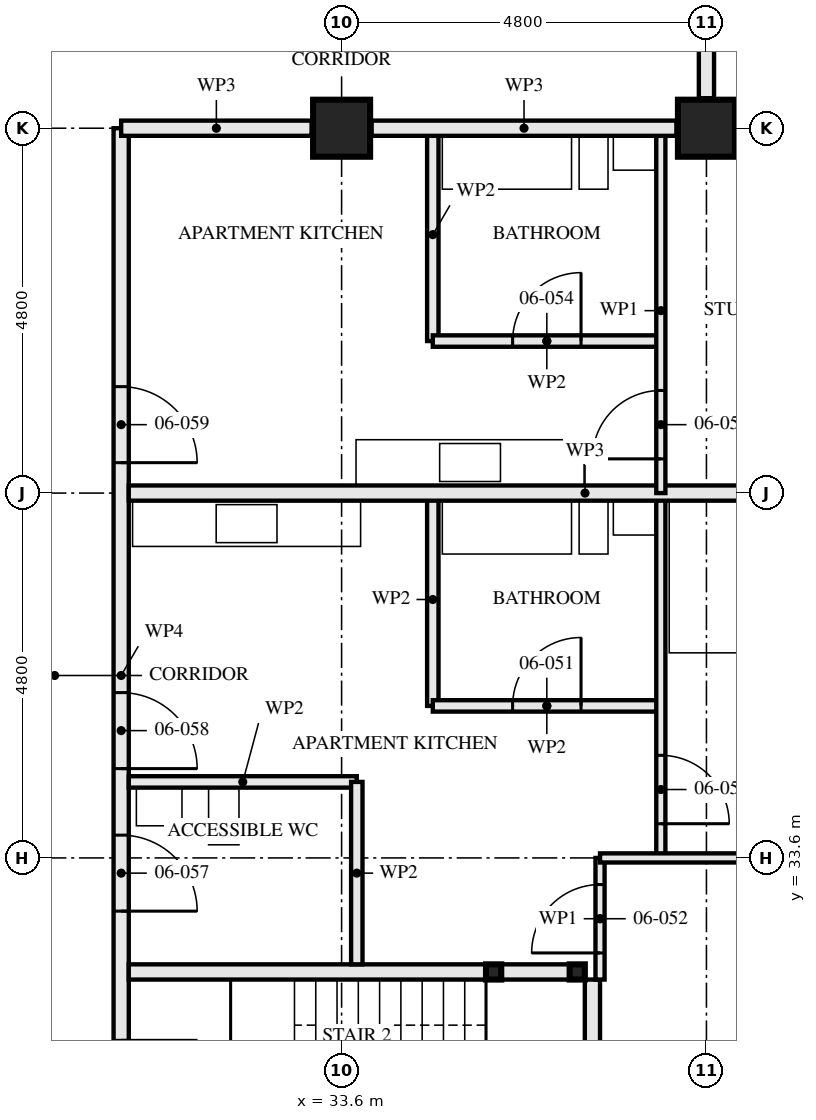
"""IFC4 building model, lengths in metres.
Left out: names, types, materials, properties, quantities, classifications, styles, units other than length and angle.
Written with IfcOpenShell. Run it as: python <this file> out.ifc"""

import sys

from ifc_helpers import new_model, si_unit, direction, frame, frame_2d, origin, origin_2d, place, context, subcontext, project, spatial, rectangle, hollow_rectangle, extrude, element, fill, save


model = new_model("IFC4")
c1 = context("Model", 3, precision=1e-05, world=origin(), true_north=direction((0.0, 1.0)))
c2 = subcontext(c1, "Body", "Model", "MODEL_VIEW")
j1 = project(units=[si_unit("LENGTHUNIT", "METRE"), si_unit("PLANEANGLEUNIT", "RADIAN")], contexts=[c1])
p1 = place(None, origin())
s1 = spatial("IfcSite", under=j1, at=p1, CompositionType="ELEMENT")
p2 = place(p1, origin())
s2 = spatial("IfcBuilding", under=s1, at=p2, CompositionType="ELEMENT")
p3 = place(p2, frame((0.0, 0.0, 27.0)))
s3 = spatial("IfcBuildingStorey", under=s2, at=p3, CompositionType="ELEMENT", Elevation=27.0)
for number, where, z_axis, x_axis in (
    (1, (33.6, 43.2, 0.0), (0.0, 0.0, 1.0), (0.0, 1.0, 0.0)),
    (2, (38.4, 43.2, 0.0), (0.0, 0.0, 1.0), (0.0, 1.0, 0.0)),
):
    element("IfcColumn", number, at=place(p3, frame(where, z_axis=z_axis, x_axis=x_axis)), inside=s3, PredefinedType="COLUMN", context=c2, shape_type="SweptSolid", body=[
        extrude(hollow_rectangle(XDim=0.75, YDim=0.75, WallThickness=0.08, at=origin_2d()), origin(), (0.0, 0.0, 1.0), 3.5),
    ])
for number, where, z_axis, x_axis in (
    (3, (36.7, 32.1, 0.0), (0.0, 0.0, 1.0), (1.0, 0.0, 0.0)),
    (4, (35.6, 32.1, 0.0), (0.0, 0.0, 1.0), (1.0, 0.0, 0.0)),
):
    element("IfcColumn", number, at=place(p3, frame(where, z_axis=z_axis, x_axis=x_axis)), inside=s3, PredefinedType="COLUMN", context=c2, shape_type="SweptSolid", body=[
        extrude(hollow_rectangle(XDim=0.2, YDim=0.2, WallThickness=0.008, at=origin_2d()), origin(), (0.0, 0.0, 1.0), 3.33),
    ])
p4 = place(p3, frame((36.6, 32.1, 0.0), z_axis=(0.0, 0.0, 1.0), x_axis=(-1.0, 0.0, 0.0)))
e5 = element("IfcWall", 5, at=p4, inside=s3, PredefinedType="SOLIDWALL", context=c2, shape_type="SweptSolid", body=[
    extrude(rectangle(XDim=0.9, YDim=0.2, at=frame_2d((0.45, 0.0))), origin(), (0.0, 0.0, 1.0), 2.99),
])
p5 = place(p3, frame((35.5, 32.1, 0.0), z_axis=(0.0, 0.0, 1.0), x_axis=(-1.0, 0.0, 0.0)))
e6 = element("IfcWall", 6, at=p5, inside=s3, PredefinedType="SOLIDWALL", context=c2, shape_type="SweptSolid", body=[
    extrude(rectangle(XDim=4.7, YDim=0.2, at=frame_2d((2.35, 0.0))), origin(), (0.0, 0.0, 1.0), 2.99),
])
p6 = place(p3, frame((36.9, 29.4, 0.0), z_axis=(0.0, 0.0, 1.0), x_axis=(0.0, 1.0, 0.0)))
e7 = element("IfcWall", 7, at=p6, inside=s3, PredefinedType="SOLIDWALL", context=c2, shape_type="SweptSolid", body=[
    extrude(rectangle(XDim=2.6, YDim=0.2, at=frame_2d((1.3, 0.0))), origin(), (0.0, 0.0, 1.0), 3.33),
])
p7 = place(p3, frame((33.8, 32.2, 0.0), z_axis=(0.0, 0.0, 1.0), x_axis=(0.0, 1.0, 0.0)))
e8 = element("IfcWall", 8, at=p7, inside=s3, PredefinedType="PARTITIONING", context=c2, shape_type="SweptSolid", body=[
    extrude(rectangle(XDim=2.4, YDim=0.15, at=frame_2d((1.2, 0.0))), origin(), (0.0, 0.0, 1.0), 2.55),
])
p8 = place(p3, frame((33.8, 34.6, 0.0), z_axis=(0.0, 0.0, 1.0), x_axis=(-1.0, 0.0, 0.0)))
e9 = element("IfcWall", 9, at=p8, inside=s3, PredefinedType="PARTITIONING", context=c2, shape_type="SweptSolid", body=[
    extrude(rectangle(XDim=3.0, YDim=0.15, at=frame_2d((1.5, 0.0))), origin(), (0.0, 0.0, 1.0), 3.33),
])
p9 = place(p3, frame((37.8, 35.6, 0.0), z_axis=(0.0, 0.0, 1.0), x_axis=(-1.0, 0.0, 0.0)))
e10 = element("IfcWall", 10, at=p9, inside=s3, PredefinedType="PARTITIONING", context=c2, shape_type="SweptSolid", body=[
    extrude(rectangle(XDim=3.0, YDim=0.15, at=frame_2d((1.5, 0.0))), origin(), (0.0, 0.0, 1.0), 3.33),
])
p10 = place(p9, frame((1.05, 0.0, 0.0)))
e11 = element("IfcOpeningElement", 11, at=p10, cuts=e10, PredefinedType="OPENING", context=c2, shape_type="SweptSolid", body=[
    extrude(rectangle(XDim=0.9, YDim=2.1, at=frame_2d((0.45, 1.05))), frame((0.0, 0.085, 0.0), z_axis=(0.0, -1.0, 0.0), x_axis=(1.0, 0.0, 0.0)), (0.0, 0.0, 1.0), 0.171),
])
p11 = place(p3, frame((34.8, 35.6, 0.0), z_axis=(0.0, 0.0, 1.0), x_axis=(0.0, 1.0, 0.0)))
e12 = element("IfcWall", 12, at=p11, inside=s3, PredefinedType="PARTITIONING", context=c2, shape_type="SweptSolid", body=[
    extrude(rectangle(XDim=2.8, YDim=0.15, at=frame_2d((1.4, 0.0))), origin(), (0.0, 0.0, 1.0), 3.33),
])
p12 = place(p3, frame((37.0, 32.0, 0.0), z_axis=(0.0, 0.0, 1.0), x_axis=(0.0, 1.0, 0.0)))
e13 = element("IfcWall", 13, at=p12, inside=s3, PredefinedType="PARTITIONING", context=c2, shape_type="SweptSolid", body=[
    extrude(rectangle(XDim=1.6, YDim=0.12, at=frame_2d((0.8, 0.0))), origin(), (0.0, 0.0, 1.0), 3.33),
])
p13 = place(p12, frame((0.35, 0.0, 0.0)))
e14 = element("IfcOpeningElement", 14, at=p13, cuts=e13, PredefinedType="OPENING", context=c2, shape_type="SweptSolid", body=[
    extrude(rectangle(XDim=0.9, YDim=2.1, at=frame_2d((0.45, 1.05))), frame((0.0, 0.071, 0.0), z_axis=(0.0, -1.0, 0.0), x_axis=(1.0, 0.0, 0.0)), (0.0, 0.0, 1.0), 0.141),
])
p14 = place(p3, frame((37.8, 33.6, 0.0), z_axis=(0.0, 0.0, 1.0), x_axis=(0.0, 1.0, 0.0)))
e15 = element("IfcWall", 15, at=p14, inside=s3, PredefinedType="PARTITIONING", context=c2, shape_type="SweptSolid", body=[
    extrude(rectangle(XDim=4.8, YDim=0.12, at=frame_2d((2.4, 0.0))), origin(), (0.0, 0.0, 1.0), 3.33),
])
p15 = place(p14, frame((0.45, 0.0, 0.0)))
e16 = element("IfcOpeningElement", 16, at=p15, cuts=e15, PredefinedType="OPENING", context=c2, shape_type="SweptSolid", body=[
    extrude(rectangle(XDim=0.9, YDim=2.1, at=frame_2d((0.45, 1.05))), frame((0.0, 0.071, 0.0), z_axis=(0.0, -1.0, 0.0), x_axis=(1.0, 0.0, 0.0)), (0.0, 0.0, 1.0), 0.141),
])
p16 = place(p3, frame((42.805, 33.6, 0.0), z_axis=(0.0, 0.0, 1.0), x_axis=(-1.0, 0.0, 0.0)))
e17 = element("IfcWall", 17, at=p16, inside=s3, PredefinedType="PARTITIONING", context=c2, shape_type="SweptSolid", body=[
    extrude(rectangle(XDim=5.805, YDim=0.12, at=frame_2d((2.902, 0.0))), origin(), (0.0, 0.0, 1.0), 2.55),
])
p17 = place(p3, frame((42.805, 38.4, 0.0), z_axis=(0.0, 0.0, 1.0), x_axis=(-1.0, 0.0, 0.0)))
e18 = element("IfcWall", 18, at=p17, inside=s3, PredefinedType="PARTITIONING", context=c2, shape_type="SweptSolid", body=[
    extrude(rectangle(XDim=12.005, YDim=0.2, at=frame_2d((6.002, 0.0))), origin(), (0.0, 0.0, 1.0), 2.55),
])
p18 = place(p3, frame((37.8, 40.4, 0.0), z_axis=(0.0, 0.0, 1.0), x_axis=(-1.0, 0.0, 0.0)))
e19 = element("IfcWall", 19, at=p18, inside=s3, PredefinedType="PARTITIONING", context=c2, shape_type="SweptSolid", body=[
    extrude(rectangle(XDim=3.0, YDim=0.15, at=frame_2d((1.5, 0.0))), origin(), (0.0, 0.0, 1.0), 3.33),
])
p19 = place(p18, frame((1.05, 0.0, 0.0)))
e20 = element("IfcOpeningElement", 20, at=p19, cuts=e19, PredefinedType="OPENING", context=c2, shape_type="SweptSolid", body=[
    extrude(rectangle(XDim=0.9, YDim=2.1, at=frame_2d((0.45, 1.05))), frame((0.0, 0.085, 0.0), z_axis=(0.0, -1.0, 0.0), x_axis=(1.0, 0.0, 0.0)), (0.0, 0.0, 1.0), 0.171),
])
p20 = place(p3, frame((34.8, 40.4, 0.0), z_axis=(0.0, 0.0, 1.0), x_axis=(0.0, 1.0, 0.0)))
e21 = element("IfcWall", 21, at=p20, inside=s3, PredefinedType="PARTITIONING", context=c2, shape_type="SweptSolid", body=[
    extrude(rectangle(XDim=2.8, YDim=0.15, at=frame_2d((1.4, 0.0))), origin(), (0.0, 0.0, 1.0), 3.33),
])
p21 = place(p3, frame((37.8, 38.4, 0.0), z_axis=(0.0, 0.0, 1.0), x_axis=(0.0, 1.0, 0.0)))
e22 = element("IfcWall", 22, at=p21, inside=s3, PredefinedType="PARTITIONING", context=c2, shape_type="SweptSolid", body=[
    extrude(rectangle(XDim=4.8, YDim=0.12, at=frame_2d((2.4, 0.0))), origin(), (0.0, 0.0, 1.0), 3.33),
])
p22 = place(p21, frame((0.45, 0.0, 0.0)))
e23 = element("IfcOpeningElement", 23, at=p22, cuts=e22, PredefinedType="OPENING", context=c2, shape_type="SweptSolid", body=[
    extrude(rectangle(XDim=0.9, YDim=2.1, at=frame_2d((0.45, 1.05))), frame((0.0, 0.071, 0.0), z_axis=(0.0, -1.0, 0.0), x_axis=(1.0, 0.0, 0.0)), (0.0, 0.0, 1.0), 0.141),
])
p23 = place(p3, frame((30.7, 28.8, 0.0), z_axis=(0.0, 0.0, 1.0), x_axis=(0.0, 1.0, 0.0)))
e24 = element("IfcWall", 24, at=p23, inside=s3, PredefinedType="PARTITIONING", context=c2, shape_type="SweptSolid", body=[
    extrude(rectangle(XDim=14.4, YDim=0.2, at=frame_2d((7.2, 0.0))), origin(), (0.0, 0.0, 1.0), 2.55),
])
p24 = place(p23, frame((1.4, 0.0, 0.0)))
e25 = element("IfcOpeningElement", 25, at=p24, cuts=e24, PredefinedType="OPENING", context=c2, shape_type="SweptSolid", body=[
    extrude(rectangle(XDim=1.0, YDim=2.1, at=frame_2d((0.5, 1.05))), frame((0.0, 0.111, 0.0), z_axis=(0.0, -1.0, 0.0), x_axis=(1.0, 0.0, 0.0)), (0.0, 0.0, 1.0), 0.221),
])
p25 = place(p23, frame((4.1, 0.0, 0.0)))
e26 = element("IfcOpeningElement", 26, at=p25, cuts=e24, PredefinedType="OPENING", context=c2, shape_type="SweptSolid", body=[
    extrude(rectangle(XDim=1.0, YDim=2.1, at=frame_2d((0.5, 1.05))), frame((0.0, 0.111, 0.0), z_axis=(0.0, -1.0, 0.0), x_axis=(1.0, 0.0, 0.0)), (0.0, 0.0, 1.0), 0.221),
])
p26 = place(p23, frame((5.975, 0.0, 0.0)))
e27 = element("IfcOpeningElement", 27, at=p26, cuts=e24, PredefinedType="OPENING", context=c2, shape_type="SweptSolid", body=[
    extrude(rectangle(XDim=1.0, YDim=2.1, at=frame_2d((0.5, 1.05))), frame((0.0, 0.111, 0.0), z_axis=(0.0, -1.0, 0.0), x_axis=(1.0, 0.0, 0.0)), (0.0, 0.0, 1.0), 0.221),
])
p27 = place(p23, frame((10.0, 0.0, 0.0)))
e28 = element("IfcOpeningElement", 28, at=p27, cuts=e24, PredefinedType="OPENING", context=c2, shape_type="SweptSolid", body=[
    extrude(rectangle(XDim=1.0, YDim=2.1, at=frame_2d((0.5, 1.05))), frame((0.0, 0.111, 0.0), z_axis=(0.0, -1.0, 0.0), x_axis=(1.0, 0.0, 0.0)), (0.0, 0.0, 1.0), 0.221),
])
p28 = place(p3, frame((38.4, 45.2, 0.0), z_axis=(0.0, 0.0, 1.0), x_axis=(0.0, -1.0, 0.0)))
e29 = element("IfcWall", 29, at=p28, inside=s3, PredefinedType="PARTITIONING", context=c2, shape_type="SweptSolid", body=[
    extrude(rectangle(XDim=1.605, YDim=0.2, at=frame_2d((0.802, 0.0))), origin(), (0.0, 0.0, 1.0), 3.33),
])
p29 = place(p3, frame((42.896, 43.2, 0.0), z_axis=(0.0, 0.0, 1.0), x_axis=(-1.0, 0.0, 0.0)))
e30 = element("IfcWall", 30, at=p29, inside=s3, PredefinedType="PARTITIONING", context=c2, shape_type="SweptSolid", body=[
    extrude(rectangle(XDim=4.101, YDim=0.2, at=frame_2d((2.05, 0.0))), origin(), (0.0, 0.0, 1.0), 2.32),
])
p30 = place(p3, frame((38.005, 43.2, 0.0), z_axis=(0.0, 0.0, 1.0), x_axis=(-1.0, 0.0, 0.0)))
e31 = element("IfcWall", 31, at=p30, inside=s3, PredefinedType="PARTITIONING", context=c2, shape_type="SweptSolid", body=[
    extrude(rectangle(XDim=4.01, YDim=0.2, at=frame_2d((2.005, 0.0))), origin(), (0.0, 0.0, 1.0), 2.32),
])
p31 = place(p3, frame((33.205, 43.2, 0.0), z_axis=(0.0, 0.0, 1.0), x_axis=(-1.0, 0.0, 0.0)))
e32 = element("IfcWall", 32, at=p31, inside=s3, PredefinedType="PARTITIONING", context=c2, shape_type="SweptSolid", body=[
    extrude(rectangle(XDim=2.505, YDim=0.2, at=frame_2d((1.252, 0.0))), origin(), (0.0, 0.0, 1.0), 2.32),
])
p32 = place(p10, frame((0.9, 0.0, 0.0), z_axis=(0.0, 0.0, 1.0), x_axis=(-1.0, 0.0, 0.0)))
e33 = element("IfcDoor", 33, at=p32, inside=s3, OperationType="SINGLE_SWING_LEFT", PredefinedType="DOOR", context=c2, shape_type="SweptSolid", body=[
    extrude(rectangle(XDim=0.9, YDim=2.1, at=frame_2d((0.45, 1.05))), frame((0.0, 0.022, 0.0), z_axis=(0.0, -1.0, 0.0), x_axis=(1.0, 0.0, 0.0)), (0.0, 0.0, 1.0), 0.044),
])
fill(e11, e33)
p33 = place(p13, origin())
e34 = element("IfcDoor", 34, at=p33, inside=s3, OperationType="SINGLE_SWING_RIGHT", PredefinedType="DOOR", context=c2, shape_type="SweptSolid", body=[
    extrude(rectangle(XDim=0.9, YDim=2.1, at=frame_2d((0.45, 1.05))), frame((0.0, 0.022, 0.0), z_axis=(0.0, -1.0, 0.0), x_axis=(1.0, 0.0, 0.0)), (0.0, 0.0, 1.0), 0.044),
])
fill(e14, e34)
p34 = place(p15, frame((0.9, 0.0, 0.0), z_axis=(0.0, 0.0, 1.0), x_axis=(-1.0, 0.0, 0.0)))
e35 = element("IfcDoor", 35, at=p34, inside=s3, OperationType="SINGLE_SWING_LEFT", PredefinedType="DOOR", context=c2, shape_type="SweptSolid", body=[
    extrude(rectangle(XDim=0.9, YDim=2.1, at=frame_2d((0.45, 1.05))), frame((0.0, 0.022, 0.0), z_axis=(0.0, -1.0, 0.0), x_axis=(1.0, 0.0, 0.0)), (0.0, 0.0, 1.0), 0.044),
])
fill(e16, e35)
p35 = place(p19, frame((0.9, 0.0, 0.0), z_axis=(0.0, 0.0, 1.0), x_axis=(-1.0, 0.0, 0.0)))
e36 = element("IfcDoor", 36, at=p35, inside=s3, OperationType="SINGLE_SWING_LEFT", PredefinedType="DOOR", context=c2, shape_type="SweptSolid", body=[
    extrude(rectangle(XDim=0.9, YDim=2.1, at=frame_2d((0.45, 1.05))), frame((0.0, 0.022, 0.0), z_axis=(0.0, -1.0, 0.0), x_axis=(1.0, 0.0, 0.0)), (0.0, 0.0, 1.0), 0.044),
])
fill(e20, e36)
p36 = place(p22, origin())
e37 = element("IfcDoor", 37, at=p36, inside=s3, OperationType="SINGLE_SWING_RIGHT", PredefinedType="DOOR", context=c2, shape_type="SweptSolid", body=[
    extrude(rectangle(XDim=0.9, YDim=2.1, at=frame_2d((0.45, 1.05))), frame((0.0, 0.022, 0.0), z_axis=(0.0, -1.0, 0.0), x_axis=(1.0, 0.0, 0.0)), (0.0, 0.0, 1.0), 0.044),
])
fill(e23, e37)
p37 = place(p25, frame((1.0, 0.0, 0.0), z_axis=(0.0, 0.0, 1.0), x_axis=(-1.0, 0.0, 0.0)))
e38 = element("IfcDoor", 38, at=p37, inside=s3, OperationType="SINGLE_SWING_LEFT", PredefinedType="DOOR", context=c2, shape_type="SweptSolid", body=[
    extrude(rectangle(XDim=1.0, YDim=2.1, at=frame_2d((0.5, 1.05))), frame((0.0, 0.027, 0.0), z_axis=(0.0, -1.0, 0.0), x_axis=(1.0, 0.0, 0.0)), (0.0, 0.0, 1.0), 0.054),
])
fill(e26, e38)
p38 = place(p26, frame((1.0, 0.0, 0.0), z_axis=(0.0, 0.0, 1.0), x_axis=(-1.0, 0.0, 0.0)))
e39 = element("IfcDoor", 39, at=p38, inside=s3, OperationType="SINGLE_SWING_LEFT", PredefinedType="DOOR", context=c2, shape_type="SweptSolid", body=[
    extrude(rectangle(XDim=1.0, YDim=2.1, at=frame_2d((0.5, 1.05))), frame((0.0, 0.027, 0.0), z_axis=(0.0, -1.0, 0.0), x_axis=(1.0, 0.0, 0.0)), (0.0, 0.0, 1.0), 0.054),
])
fill(e27, e39)
p39 = place(p27, frame((1.0, 0.0, 0.0), z_axis=(0.0, 0.0, 1.0), x_axis=(-1.0, 0.0, 0.0)))
e40 = element("IfcDoor", 40, at=p39, inside=s3, OperationType="SINGLE_SWING_LEFT", PredefinedType="DOOR", context=c2, shape_type="SweptSolid", body=[
    extrude(rectangle(XDim=1.0, YDim=2.1, at=frame_2d((0.5, 1.05))), frame((0.0, 0.027, 0.0), z_axis=(0.0, -1.0, 0.0), x_axis=(1.0, 0.0, 0.0)), (0.0, 0.0, 1.0), 0.054),
])
fill(e28, e40)
save(model, sys.argv[1])
